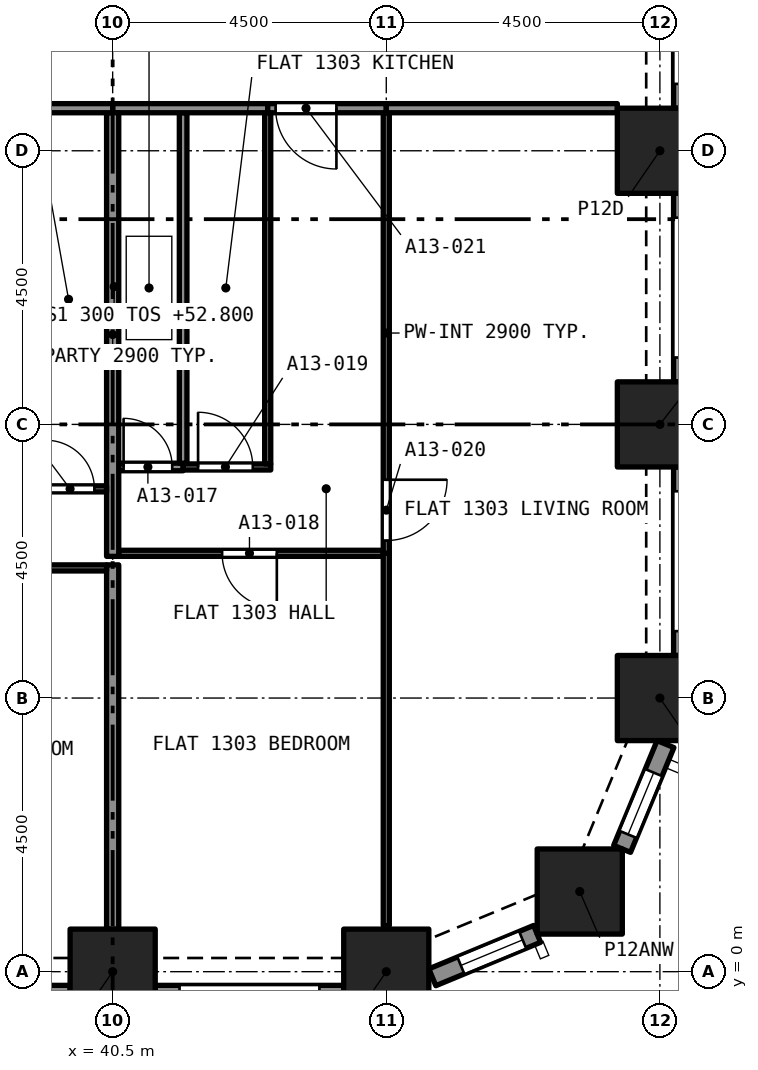
"""IFC4 building model, lengths in metres.
Left out: names, types, materials, properties, quantities, classifications, styles, units other than length and angle.
Written with IfcOpenShell. Run it as: python <this file> out.ifc"""

import sys

from ifc_helpers import new_model, si_unit, direction, frame, frame_2d, origin, origin_2d, place, context, subcontext, project, spatial, rectangle, extrude, element, fill, save


model = new_model("IFC4")
c1 = context("Model", 3, precision=1e-05, world=origin(), true_north=direction((0.0, 1.0)))
c2 = subcontext(c1, "Body", "Model", "MODEL_VIEW")
j1 = project(units=[si_unit("LENGTHUNIT", "METRE"), si_unit("PLANEANGLEUNIT", "RADIAN")], contexts=[c1])
p1 = place(None, origin())
s1 = spatial("IfcSite", under=j1, at=p1, CompositionType="ELEMENT")
p2 = place(p1, origin())
s2 = spatial("IfcBuilding", under=s1, at=p2, CompositionType="ELEMENT")
p3 = place(p2, frame((0.0, 0.0, 52.8)))
s3 = spatial("IfcBuildingStorey", under=s2, at=p3, CompositionType="ELEMENT", Elevation=52.8)
for number, where, z_axis, x_axis in (
    (1, (40.5, 0.0, 0.0), (0.0, 0.0, 1.0), (1.0, 0.0, 0.0)),
    (2, (45.0, 0.0, 0.0), (0.0, 0.0, 1.0), (1.0, 0.0, 0.0)),
    (3, (48.182, 1.318, 0.0), (0.0, 0.0, 1.0), (1.0, 0.0, 0.0)),
    (4, (49.5, 4.5, 0.0), (0.0, 0.0, 1.0), (1.0, 0.0, 0.0)),
    (5, (49.5, 9.0, 0.0), (0.0, 0.0, 1.0), (1.0, 0.0, 0.0)),
    (6, (49.5, 13.5, 0.0), (0.0, 0.0, 1.0), (1.0, 0.0, 0.0)),
):
    element("IfcColumn", number, at=place(p3, frame(where, z_axis=z_axis, x_axis=x_axis)), inside=s3, PredefinedType="COLUMN", context=c2, shape_type="SweptSolid", body=[
        extrude(rectangle(XDim=1.4, YDim=1.4, at=origin_2d()), origin(), (0.0, 0.0, 1.0), 3.2),
    ])
p4 = place(p3, frame((39.8, -0.375, 0.0), z_axis=(0.0, 0.0, 1.0), x_axis=(-1.0, 0.0, 0.0)))
e7 = element("IfcWall", 7, at=p4, inside=s3, PredefinedType="SOLIDWALL", context=c2, shape_type="SweptSolid", body=[
    extrude(rectangle(XDim=3.1, YDim=0.3, at=frame_2d((1.55, 0.0))), origin(), (0.0, 0.0, 1.0), 3.2),
])
p5 = place(p4, frame((0.4, 0.0, 0.45)))
e8 = element("IfcOpeningElement", 8, at=p5, cuts=e7, PredefinedType="OPENING", context=c2, shape_type="SweptSolid", body=[
    extrude(rectangle(XDim=2.3, YDim=1.95, at=frame_2d((1.15, 0.975))), frame((0.0, 0.16, 0.0), z_axis=(0.0, -1.0, 0.0), x_axis=(1.0, 0.0, 0.0)), (0.0, 0.0, 1.0), 0.32),
])
p6 = place(p3, frame((44.3, -0.375, 0.0), z_axis=(0.0, 0.0, 1.0), x_axis=(-1.0, 0.0, 0.0)))
e9 = element("IfcWall", 9, at=p6, inside=s3, PredefinedType="SOLIDWALL", context=c2, shape_type="SweptSolid", body=[
    extrude(rectangle(XDim=3.1, YDim=0.3, at=frame_2d((1.55, 0.0))), origin(), (0.0, 0.0, 1.0), 3.2),
])
p7 = place(p6, frame((0.4, 0.0, 0.45)))
e10 = element("IfcOpeningElement", 10, at=p7, cuts=e9, PredefinedType="OPENING", context=c2, shape_type="SweptSolid", body=[
    extrude(rectangle(XDim=2.3, YDim=1.95, at=frame_2d((1.15, 0.975))), frame((0.0, 0.16, 0.0), z_axis=(0.0, -1.0, 0.0), x_axis=(1.0, 0.0, 0.0)), (0.0, 0.0, 1.0), 0.32),
])
p8 = place(p3, frame((47.48, 0.622, 0.0), z_axis=(0.0, 0.0, 1.0), x_axis=(-0.923903565336, -0.38262540684, 0.0)))
e11 = element("IfcWall", 11, at=p8, inside=s3, PredefinedType="SOLIDWALL", context=c2, shape_type="SweptSolid", body=[
    extrude(rectangle(XDim=1.865, YDim=0.3, at=frame_2d((0.933, 0.0))), origin(), (0.0, 0.0, 1.0), 3.2),
])
p9 = place(p8, frame((0.258, 0.0, 0.45)))
e12 = element("IfcOpeningElement", 12, at=p9, cuts=e11, PredefinedType="OPENING", context=c2, shape_type="SweptSolid", body=[
    extrude(rectangle(XDim=1.1, YDim=1.95, at=frame_2d((0.55, 0.975))), frame((0.0, 0.16, 0.0), z_axis=(0.0, -1.0, 0.0), x_axis=(1.0, 0.0, 0.0)), (0.0, 0.0, 1.0), 0.32),
])
p10 = place(p3, frame((49.592, 3.743, 0.0), z_axis=(0.0, 0.0, 1.0), x_axis=(-0.382737135771, -0.923857286003, 0.0)))
e13 = element("IfcWall", 13, at=p10, inside=s3, PredefinedType="SOLIDWALL", context=c2, shape_type="SweptSolid", body=[
    extrude(rectangle(XDim=1.865, YDim=0.3, at=frame_2d((0.933, 0.0))), origin(), (0.0, 0.0, 1.0), 3.2),
])
p11 = place(p10, frame((0.508, 0.0, 0.45)))
e14 = element("IfcOpeningElement", 14, at=p11, cuts=e13, PredefinedType="OPENING", context=c2, shape_type="SweptSolid", body=[
    extrude(rectangle(XDim=1.1, YDim=1.95, at=frame_2d((0.55, 0.975))), frame((0.0, 0.16, 0.0), z_axis=(0.0, -1.0, 0.0), x_axis=(1.0, 0.0, 0.0)), (0.0, 0.0, 1.0), 0.32),
])
p12 = place(p3, frame((49.875, 8.3, 0.0), z_axis=(0.0, 0.0, 1.0), x_axis=(0.0, -1.0, 0.0)))
e15 = element("IfcWall", 15, at=p12, inside=s3, PredefinedType="SOLIDWALL", context=c2, shape_type="SweptSolid", body=[
    extrude(rectangle(XDim=3.1, YDim=0.3, at=frame_2d((1.55, 0.0))), origin(), (0.0, 0.0, 1.0), 3.2),
])
p13 = place(p12, frame((0.4, 0.0, 0.45)))
e16 = element("IfcOpeningElement", 16, at=p13, cuts=e15, PredefinedType="OPENING", context=c2, shape_type="SweptSolid", body=[
    extrude(rectangle(XDim=2.3, YDim=1.95, at=frame_2d((1.15, 0.975))), frame((0.0, 0.16, 0.0), z_axis=(0.0, -1.0, 0.0), x_axis=(1.0, 0.0, 0.0)), (0.0, 0.0, 1.0), 0.32),
])
p14 = place(p3, frame((49.875, 12.8, 0.0), z_axis=(0.0, 0.0, 1.0), x_axis=(0.0, -1.0, 0.0)))
e17 = element("IfcWall", 17, at=p14, inside=s3, PredefinedType="SOLIDWALL", context=c2, shape_type="SweptSolid", body=[
    extrude(rectangle(XDim=3.1, YDim=0.3, at=frame_2d((1.55, 0.0))), origin(), (0.0, 0.0, 1.0), 3.2),
])
p15 = place(p14, frame((0.4, 0.0, 0.45)))
e18 = element("IfcOpeningElement", 18, at=p15, cuts=e17, PredefinedType="OPENING", context=c2, shape_type="SweptSolid", body=[
    extrude(rectangle(XDim=2.3, YDim=1.95, at=frame_2d((1.15, 0.975))), frame((0.0, 0.16, 0.0), z_axis=(0.0, -1.0, 0.0), x_axis=(1.0, 0.0, 0.0)), (0.0, 0.0, 1.0), 0.32),
])
p16 = place(p3, frame((49.875, 17.3, 0.0), z_axis=(0.0, 0.0, 1.0), x_axis=(0.0, -1.0, 0.0)))
e19 = element("IfcWall", 19, at=p16, inside=s3, PredefinedType="SOLIDWALL", context=c2, shape_type="SweptSolid", body=[
    extrude(rectangle(XDim=3.1, YDim=0.3, at=frame_2d((1.55, 0.0))), origin(), (0.0, 0.0, 1.0), 3.2),
])
p17 = place(p16, frame((0.4, 0.0, 0.45)))
e20 = element("IfcOpeningElement", 20, at=p17, cuts=e19, PredefinedType="OPENING", context=c2, shape_type="SweptSolid", body=[
    extrude(rectangle(XDim=2.3, YDim=1.95, at=frame_2d((1.15, 0.975))), frame((0.0, 0.16, 0.0), z_axis=(0.0, -1.0, 0.0), x_axis=(1.0, 0.0, 0.0)), (0.0, 0.0, 1.0), 0.32),
])
p18 = place(p3, frame((40.6, 8.3, 0.0), z_axis=(0.0, 0.0, 1.0), x_axis=(1.0, 0.0, 0.0)))
e21 = element("IfcWall", 21, at=p18, inside=s3, PredefinedType="PARTITIONING", context=c2, shape_type="SweptSolid", body=[
    extrude(rectangle(XDim=1.059, YDim=0.125, at=frame_2d((0.53, 0.0))), origin(), (0.0, 0.0, 1.0), 2.9),
])
p19 = place(p18, frame((0.08, 0.0, 0.0)))
e22 = element("IfcOpeningElement", 22, at=p19, cuts=e21, PredefinedType="OPENING", context=c2, shape_type="SweptSolid", body=[
    extrude(rectangle(XDim=0.8, YDim=2.1, at=frame_2d((0.4, 1.05))), frame((0.0, 0.073, 0.0), z_axis=(0.0, -1.0, 0.0), x_axis=(1.0, 0.0, 0.0)), (0.0, 0.0, 1.0), 0.145),
])
p20 = place(p3, frame((41.659, 8.363, 0.0), z_axis=(0.0, 0.0, 1.0), x_axis=(0.0, 1.0, 0.0)))
e23 = element("IfcWall", 23, at=p20, inside=s3, PredefinedType="PARTITIONING", context=c2, shape_type="SweptSolid", body=[
    extrude(rectangle(XDim=5.762, YDim=0.125, at=frame_2d((2.881, 0.0))), origin(), (0.0, 0.0, 1.0), 2.9),
])
p21 = place(p3, frame((40.5, 14.2, 0.0), z_axis=(0.0, 0.0, 1.0), x_axis=(1.0, 0.0, 0.0)))
e24 = element("IfcWall", 24, at=p21, inside=s3, PredefinedType="PARTITIONING", context=c2, shape_type="SweptSolid", body=[
    extrude(rectangle(XDim=2.55, YDim=0.15, at=frame_2d((1.275, 0.0))), origin(), (0.0, 0.0, 1.0), 2.9),
])
p22 = place(p3, frame((44.95, 6.88, 0.0), z_axis=(0.0, 0.0, 1.0), x_axis=(-1.0, 0.0, 0.0)))
e25 = element("IfcWall", 25, at=p22, inside=s3, PredefinedType="PARTITIONING", context=c2, shape_type="SweptSolid", body=[
    extrude(rectangle(XDim=4.35, YDim=0.1, at=frame_2d((2.175, 0.0))), origin(), (0.0, 0.0, 1.0), 2.9),
])
p23 = place(p22, frame((1.75, 0.0, 0.0)))
e26 = element("IfcOpeningElement", 26, at=p23, cuts=e25, PredefinedType="OPENING", context=c2, shape_type="SweptSolid", body=[
    extrude(rectangle(XDim=0.9, YDim=2.1, at=frame_2d((0.45, 1.05))), frame((0.0, 0.06, 0.0), z_axis=(0.0, -1.0, 0.0), x_axis=(1.0, 0.0, 0.0)), (0.0, 0.0, 1.0), 0.12),
])
p24 = place(p3, frame((45.0, 0.758, 0.0), z_axis=(0.0, 0.0, 1.0), x_axis=(0.0, 1.0, 0.0)))
e27 = element("IfcWall", 27, at=p24, inside=s3, PredefinedType="PARTITIONING", context=c2, shape_type="SweptSolid", body=[
    extrude(rectangle(XDim=6.122, YDim=0.1, at=frame_2d((3.061, 0.0))), origin(), (0.0, 0.0, 1.0), 2.9),
])
p25 = place(p3, frame((40.5, 0.7, 0.0), z_axis=(0.0, 0.0, 1.0), x_axis=(0.0, 1.0, 0.0)))
e28 = element("IfcWall", 28, at=p25, inside=s3, PredefinedType="PARTITIONING", context=c2, shape_type="SweptSolid", body=[
    extrude(rectangle(XDim=5.99, YDim=0.2, at=frame_2d((2.995, 0.0))), origin(), (0.0, 0.0, 1.0), 2.9),
])
p26 = place(p3, frame((41.659, 8.3, 0.0), z_axis=(0.0, 0.0, 1.0), x_axis=(1.0, 0.0, 0.0)))
e29 = element("IfcWall", 29, at=p26, inside=s3, PredefinedType="PARTITIONING", context=c2, shape_type="SweptSolid", body=[
    extrude(rectangle(XDim=1.441, YDim=0.1, at=frame_2d((0.72, 0.0))), origin(), (0.0, 0.0, 1.0), 2.9),
])
p27 = place(p26, frame((0.246, 0.0, 0.0)))
e30 = element("IfcOpeningElement", 30, at=p27, cuts=e29, PredefinedType="OPENING", context=c2, shape_type="SweptSolid", body=[
    extrude(rectangle(XDim=0.9, YDim=2.1, at=frame_2d((0.45, 1.05))), frame((0.0, 0.06, 0.0), z_axis=(0.0, -1.0, 0.0), x_axis=(1.0, 0.0, 0.0)), (0.0, 0.0, 1.0), 0.12),
])
p28 = place(p3, frame((43.05, 8.35, 0.0), z_axis=(0.0, 0.0, 1.0), x_axis=(0.0, 1.0, 0.0)))
e31 = element("IfcWall", 31, at=p28, inside=s3, PredefinedType="PARTITIONING", context=c2, shape_type="SweptSolid", body=[
    extrude(rectangle(XDim=5.775, YDim=0.1, at=frame_2d((2.887, 0.0))), origin(), (0.0, 0.0, 1.0), 2.9),
])
p29 = place(p3, frame((45.0, 14.125, 0.0), z_axis=(0.0, 0.0, 1.0), x_axis=(0.0, -1.0, 0.0)))
e32 = element("IfcWall", 32, at=p29, inside=s3, PredefinedType="PARTITIONING", context=c2, shape_type="SweptSolid", body=[
    extrude(rectangle(XDim=7.245, YDim=0.1, at=frame_2d((3.623, 0.0))), origin(), (0.0, 0.0, 1.0), 2.9),
])
p30 = place(p29, frame((6.035, 0.0, 0.0)))
e33 = element("IfcOpeningElement", 33, at=p30, cuts=e32, PredefinedType="OPENING", context=c2, shape_type="SweptSolid", body=[
    extrude(rectangle(XDim=1.0, YDim=2.1, at=frame_2d((0.5, 1.05))), frame((0.0, 0.06, 0.0), z_axis=(0.0, -1.0, 0.0), x_axis=(1.0, 0.0, 0.0)), (0.0, 0.0, 1.0), 0.12),
])
p31 = place(p3, frame((40.5, 6.83, 0.0), z_axis=(0.0, 0.0, 1.0), x_axis=(0.0, 1.0, 0.0)))
e34 = element("IfcWall", 34, at=p31, inside=s3, PredefinedType="PARTITIONING", context=c2, shape_type="SweptSolid", body=[
    extrude(rectangle(XDim=7.295, YDim=0.2, at=frame_2d((3.647, 0.0))), origin(), (0.0, 0.0, 1.0), 2.9),
])
p32 = place(p3, frame((45.0, 14.2, 0.0), z_axis=(0.0, 0.0, 1.0), x_axis=(-1.0, 0.0, 0.0)))
e35 = element("IfcWall", 35, at=p32, inside=s3, PredefinedType="PARTITIONING", context=c2, shape_type="SweptSolid", body=[
    extrude(rectangle(XDim=1.95, YDim=0.15, at=frame_2d((0.975, 0.0))), origin(), (0.0, 0.0, 1.0), 2.9),
])
p33 = place(p32, frame((0.82, 0.0, 0.0)))
e36 = element("IfcOpeningElement", 36, at=p33, cuts=e35, PredefinedType="OPENING", context=c2, shape_type="SweptSolid", body=[
    extrude(rectangle(XDim=1.0, YDim=2.1, at=frame_2d((0.5, 1.05))), frame((0.0, 0.085, 0.0), z_axis=(0.0, -1.0, 0.0), x_axis=(1.0, 0.0, 0.0)), (0.0, 0.0, 1.0), 0.17),
])
p34 = place(p3, frame((45.0, 14.2, 0.0), z_axis=(0.0, 0.0, 1.0), x_axis=(1.0, 0.0, 0.0)))
e37 = element("IfcWall", 37, at=p34, inside=s3, PredefinedType="PARTITIONING", context=c2, shape_type="SweptSolid", body=[
    extrude(rectangle(XDim=3.8, YDim=0.15, at=frame_2d((1.9, 0.0))), origin(), (0.0, 0.0, 1.0), 2.9),
])
p35 = place(p3, frame((40.4, 6.64, 0.0), z_axis=(0.0, 0.0, 1.0), x_axis=(-1.0, 0.0, 0.0)))
e38 = element("IfcWall", 38, at=p35, inside=s3, PredefinedType="PARTITIONING", context=c2, shape_type="SweptSolid", body=[
    extrude(rectangle(XDim=4.4, YDim=0.1, at=frame_2d((2.2, 0.0))), origin(), (0.0, 0.0, 1.0), 2.9),
])
p36 = place(p35, frame((1.7, 0.0, 0.0)))
e39 = element("IfcOpeningElement", 39, at=p36, cuts=e38, PredefinedType="OPENING", context=c2, shape_type="SweptSolid", body=[
    extrude(rectangle(XDim=0.9, YDim=2.1, at=frame_2d((0.45, 1.05))), frame((0.0, 0.06, 0.0), z_axis=(0.0, -1.0, 0.0), x_axis=(1.0, 0.0, 0.0)), (0.0, 0.0, 1.0), 0.12),
])
p37 = place(p3, frame((39.099, 7.94, 0.0), z_axis=(0.0, 0.0, 1.0), x_axis=(1.0, 0.0, 0.0)))
e40 = element("IfcWall", 40, at=p37, inside=s3, PredefinedType="PARTITIONING", context=c2, shape_type="SweptSolid", body=[
    extrude(rectangle(XDim=1.301, YDim=0.1, at=frame_2d((0.65, 0.0))), origin(), (0.0, 0.0, 1.0), 2.9),
])
p38 = place(p37, frame((0.3, 0.0, 0.0)))
e41 = element("IfcOpeningElement", 41, at=p38, cuts=e40, PredefinedType="OPENING", context=c2, shape_type="SweptSolid", body=[
    extrude(rectangle(XDim=0.8, YDim=2.1, at=frame_2d((0.4, 1.05))), frame((0.0, 0.06, 0.0), z_axis=(0.0, -1.0, 0.0), x_axis=(1.0, 0.0, 0.0)), (0.0, 0.0, 1.0), 0.12),
])
p39 = place(p3, frame((36.6, 14.2, 0.0), z_axis=(0.0, 0.0, 1.0), x_axis=(1.0, 0.0, 0.0)))
e42 = element("IfcWall", 42, at=p39, inside=s3, PredefinedType="PARTITIONING", context=c2, shape_type="SweptSolid", body=[
    extrude(rectangle(XDim=3.9, YDim=0.15, at=frame_2d((1.95, 0.0))), origin(), (0.0, 0.0, 1.0), 2.9),
])
p40 = place(p9, origin())
e43 = element("IfcWindow", 43, at=p40, inside=s3, PartitioningType="SINGLE_PANEL", PredefinedType="WINDOW", context=c2, shape_type="SweptSolid", body=[
    extrude(rectangle(XDim=1.1, YDim=1.95, at=frame_2d((0.55, 0.975))), frame((0.0, 0.03, 0.0), z_axis=(0.0, -1.0, 0.0), x_axis=(1.0, 0.0, 0.0)), (0.0, 0.0, 1.0), 0.06),
])
fill(e12, e43)
p41 = place(p11, origin())
e44 = element("IfcWindow", 44, at=p41, inside=s3, PartitioningType="SINGLE_PANEL", PredefinedType="WINDOW", context=c2, shape_type="SweptSolid", body=[
    extrude(rectangle(XDim=1.1, YDim=1.95, at=frame_2d((0.55, 0.975))), frame((0.0, 0.03, 0.0), z_axis=(0.0, -1.0, 0.0), x_axis=(1.0, 0.0, 0.0)), (0.0, 0.0, 1.0), 0.06),
])
fill(e14, e44)
p42 = place(p19, origin())
e45 = element("IfcDoor", 45, at=p42, inside=s3, OperationType="SINGLE_SWING_LEFT", PredefinedType="DOOR", context=c2, shape_type="SweptSolid", body=[
    extrude(rectangle(XDim=0.8, YDim=2.1, at=frame_2d((0.4, 1.05))), frame((0.0, 0.025, 0.0), z_axis=(0.0, -1.0, 0.0), x_axis=(1.0, 0.0, 0.0)), (0.0, 0.0, 1.0), 0.05),
])
fill(e22, e45)
p43 = place(p23, origin())
e46 = element("IfcDoor", 46, at=p43, inside=s3, OperationType="SINGLE_SWING_RIGHT", PredefinedType="DOOR", context=c2, shape_type="SweptSolid", body=[
    extrude(rectangle(XDim=0.9, YDim=2.1, at=frame_2d((0.45, 1.05))), frame((0.0, 0.025, 0.0), z_axis=(0.0, -1.0, 0.0), x_axis=(1.0, 0.0, 0.0)), (0.0, 0.0, 1.0), 0.05),
])
fill(e26, e46)
p44 = place(p27, origin())
e47 = element("IfcDoor", 47, at=p44, inside=s3, OperationType="SINGLE_SWING_LEFT", PredefinedType="DOOR", context=c2, shape_type="SweptSolid", body=[
    extrude(rectangle(XDim=0.9, YDim=2.1, at=frame_2d((0.45, 1.05))), frame((0.0, 0.025, 0.0), z_axis=(0.0, -1.0, 0.0), x_axis=(1.0, 0.0, 0.0)), (0.0, 0.0, 1.0), 0.05),
])
fill(e30, e47)
p45 = place(p30, origin())
e48 = element("IfcDoor", 48, at=p45, inside=s3, OperationType="SINGLE_SWING_RIGHT", PredefinedType="DOOR", context=c2, shape_type="SweptSolid", body=[
    extrude(rectangle(XDim=1.0, YDim=2.1, at=frame_2d((0.5, 1.05))), frame((0.0, 0.025, 0.0), z_axis=(0.0, -1.0, 0.0), x_axis=(1.0, 0.0, 0.0)), (0.0, 0.0, 1.0), 0.05),
])
fill(e33, e48)
p46 = place(p33, origin())
e49 = element("IfcDoor", 49, at=p46, inside=s3, OperationType="SINGLE_SWING_RIGHT", PredefinedType="DOOR", context=c2, shape_type="SweptSolid", body=[
    extrude(rectangle(XDim=1.0, YDim=2.1, at=frame_2d((0.5, 1.05))), frame((0.0, 0.025, 0.0), z_axis=(0.0, -1.0, 0.0), x_axis=(1.0, 0.0, 0.0)), (0.0, 0.0, 1.0), 0.05),
])
fill(e36, e49)
p47 = place(p38, origin())
e50 = element("IfcDoor", 50, at=p47, inside=s3, OperationType="SINGLE_SWING_RIGHT", PredefinedType="DOOR", context=c2, shape_type="SweptSolid", body=[
    extrude(rectangle(XDim=0.8, YDim=2.1, at=frame_2d((0.4, 1.05))), frame((0.0, 0.025, 0.0), z_axis=(0.0, -1.0, 0.0), x_axis=(1.0, 0.0, 0.0)), (0.0, 0.0, 1.0), 0.05),
])
fill(e41, e50)
save(model, sys.argv[1])
